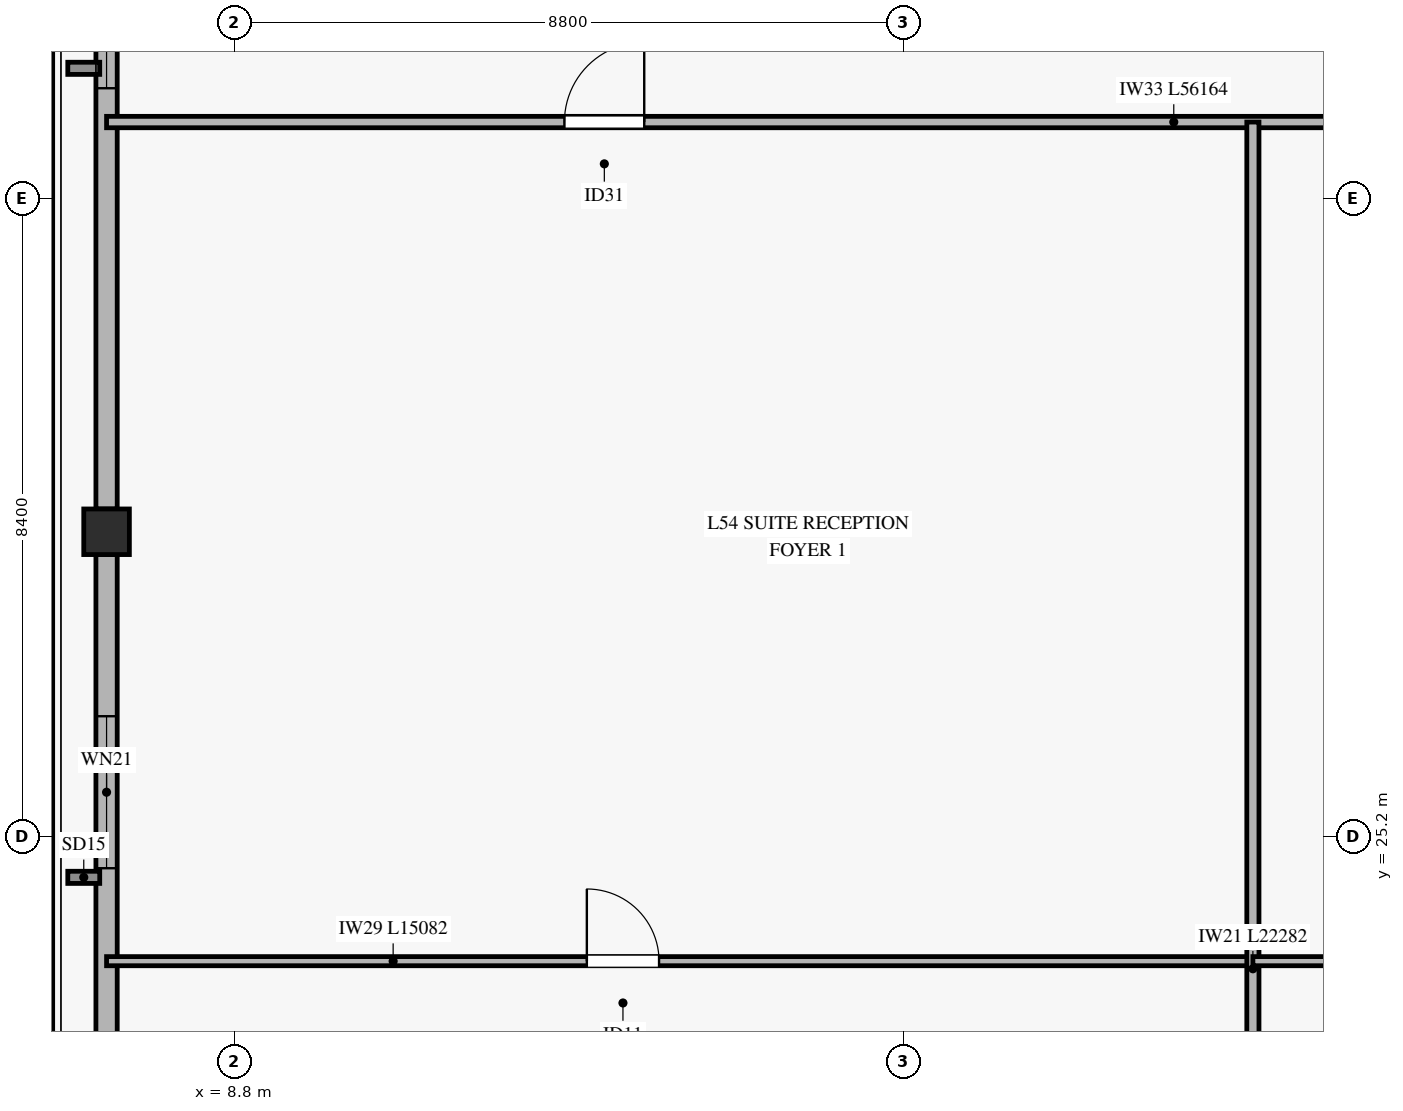
"""IFC4 building model, lengths in metres.
Left out: names, types, materials, properties, quantities, classifications, styles, units other than length and angle.
Written with IfcOpenShell. Run it as: python <this file> out.ifc"""

import sys

from ifc_helpers import new_model, si_unit, direction, frame, frame_2d, origin, origin_2d, place, context, subcontext, project, spatial, rectangle, hollow_rectangle, extrude, source, transform, mapped, element, fill, save


model = new_model("IFC4")
c1 = context("Model", 3, precision=1e-05, world=origin(), true_north=direction((0.0, 1.0)))
c2 = subcontext(c1, "Body", "Model", "MODEL_VIEW")
j1 = project(units=[si_unit("LENGTHUNIT", "METRE"), si_unit("PLANEANGLEUNIT", "RADIAN")], contexts=[c1])
p1 = place(None, origin())
s1 = spatial("IfcSite", under=j1, at=p1, CompositionType="ELEMENT")
p2 = place(p1, origin())
s2 = spatial("IfcBuilding", under=s1, at=p2, CompositionType="ELEMENT")
p3 = place(p2, frame((0.0, 0.0, 213.2)))
s3 = spatial("IfcBuildingStorey", under=s2, at=p3, CompositionType="ELEMENT", Elevation=213.2)
m1 = source(origin(), c2, "Body", "SweptSolid", [
    extrude(hollow_rectangle(XDim=0.6, YDim=0.6, WallThickness=0.028, at=origin_2d()), origin(), (0.0, 0.0, 1.0), 3.27),
])
p4 = place(p3, frame((7.118, 29.209, 0.0), z_axis=(0.0, 0.0, 1.0), x_axis=(1.0, 0.0, 0.0)))
e1 = element("IfcColumn", 1, at=p4, inside=s3, PredefinedType="COLUMN", context=c2, shape_type="MappedRepresentation", body=[
    mapped(m1, transform((0.0, 0.0, 0.0), x_axis=(1.0, 0.0, 0.0), y_axis=(0.0, 1.0, 0.0), z_axis=(0.0, 0.0, 1.0), scale=1.0)),
])
p5 = place(p3, frame((7.118, 15.072, 0.0), z_axis=(0.0, 0.0, 1.0), x_axis=(0.0, 1.0, 0.0)))
e2 = element("IfcWall", 2, at=p5, inside=s3, PredefinedType="SOLIDWALL", context=c2, shape_type="SweptSolid", body=[
    extrude(rectangle(XDim=13.837, YDim=0.28, at=frame_2d((6.918, 0.0))), origin(), (0.0, 0.0, 1.0), 2.75),
])
p6 = place(p5, frame((9.71, 0.0, 0.45)))
e3 = element("IfcOpeningElement", 3, at=p6, cuts=e2, PredefinedType="OPENING", context=c2, shape_type="SweptSolid", body=[
    extrude(rectangle(XDim=2.0, YDim=2.0, at=frame_2d((1.0, 1.0))), frame((0.0, 0.15, 0.0), z_axis=(0.0, -1.0, 0.0), x_axis=(1.0, 0.0, 0.0)), (0.0, 0.0, 1.0), 0.3),
])
p7 = place(p3, frame((7.118, 29.509, 0.0), z_axis=(0.0, 0.0, 1.0), x_axis=(0.0, 1.0, 0.0)))
e4 = element("IfcWall", 4, at=p7, inside=s3, PredefinedType="SOLIDWALL", context=c2, shape_type="SweptSolid", body=[
    extrude(rectangle(XDim=13.837, YDim=0.28, at=frame_2d((6.918, 0.0))), origin(), (0.0, 0.0, 1.0), 2.75),
])
p8 = place(p7, frame((5.536, 0.0, 0.45)))
e5 = element("IfcOpeningElement", 5, at=p8, cuts=e4, PredefinedType="OPENING", context=c2, shape_type="SweptSolid", body=[
    extrude(rectangle(XDim=2.0, YDim=2.0, at=frame_2d((1.0, 1.0))), frame((0.0, 0.15, 0.0), z_axis=(0.0, -1.0, 0.0), x_axis=(1.0, 0.0, 0.0)), (0.0, 0.0, 1.0), 0.3),
])
p9 = place(p3, frame((7.118, 34.6, 0.0), z_axis=(0.0, 0.0, 1.0), x_axis=(1.0, 0.0, 0.0)))
e6 = element("IfcWall", 6, at=p9, inside=s3, PredefinedType="PARTITIONING", context=c2, shape_type="SweptSolid", body=[
    extrude(rectangle(XDim=56.164, YDim=0.15, at=frame_2d((28.082, 0.0))), origin(), (0.0, 0.0, 1.0), 2.455),
])
p10 = place(p9, frame((6.024, 0.0, 0.0)))
e7 = element("IfcOpeningElement", 7, at=p10, cuts=e6, PredefinedType="OPENING", context=c2, shape_type="SweptSolid", body=[
    extrude(rectangle(XDim=1.05, YDim=2.15, at=frame_2d((0.525, 1.075))), frame((0.0, 0.085, 0.0), z_axis=(0.0, -1.0, 0.0), x_axis=(1.0, 0.0, 0.0)), (0.0, 0.0, 1.0), 0.17),
])
p11 = place(p9, frame((17.379, 0.0, 0.0)))
e8 = element("IfcOpeningElement", 8, at=p11, cuts=e6, PredefinedType="OPENING", context=c2, shape_type="SweptSolid", body=[
    extrude(rectangle(XDim=1.05, YDim=2.15, at=frame_2d((0.525, 1.075))), frame((0.0, 0.085, 0.0), z_axis=(0.0, -1.0, 0.0), x_axis=(1.0, 0.0, 0.0)), (0.0, 0.0, 1.0), 0.17),
])
p12 = place(p9, frame((22.751, 0.0, 0.0)))
e9 = element("IfcOpeningElement", 9, at=p12, cuts=e6, PredefinedType="OPENING", context=c2, shape_type="SweptSolid", body=[
    extrude(rectangle(XDim=1.05, YDim=2.15, at=frame_2d((0.525, 1.075))), frame((0.0, 0.085, 0.0), z_axis=(0.0, -1.0, 0.0), x_axis=(1.0, 0.0, 0.0)), (0.0, 0.0, 1.0), 0.17),
])
p13 = place(p9, frame((28.038, 0.0, 0.0)))
e10 = element("IfcOpeningElement", 10, at=p13, cuts=e6, PredefinedType="OPENING", context=c2, shape_type="SweptSolid", body=[
    extrude(rectangle(XDim=1.05, YDim=2.15, at=frame_2d((0.525, 1.075))), frame((0.0, 0.085, 0.0), z_axis=(0.0, -1.0, 0.0), x_axis=(1.0, 0.0, 0.0)), (0.0, 0.0, 1.0), 0.17),
])
p14 = place(p9, frame((33.038, 0.0, 0.0)))
e11 = element("IfcOpeningElement", 11, at=p14, cuts=e6, PredefinedType="OPENING", context=c2, shape_type="SweptSolid", body=[
    extrude(rectangle(XDim=1.05, YDim=2.15, at=frame_2d((0.525, 1.075))), frame((0.0, 0.085, 0.0), z_axis=(0.0, -1.0, 0.0), x_axis=(1.0, 0.0, 0.0)), (0.0, 0.0, 1.0), 0.17),
])
p15 = place(p9, frame((43.558, 0.0, 0.0)))
e12 = element("IfcOpeningElement", 12, at=p15, cuts=e6, PredefinedType="OPENING", context=c2, shape_type="SweptSolid", body=[
    extrude(rectangle(XDim=1.05, YDim=2.15, at=frame_2d((0.525, 1.075))), frame((0.0, 0.085, 0.0), z_axis=(0.0, -1.0, 0.0), x_axis=(1.0, 0.0, 0.0)), (0.0, 0.0, 1.0), 0.17),
])
p16 = place(p3, frame((7.118, 23.559, 0.0), z_axis=(0.0, 0.0, 1.0), x_axis=(1.0, 0.0, 0.0)))
e13 = element("IfcWall", 13, at=p16, inside=s3, PredefinedType="PARTITIONING", context=c2, shape_type="SweptSolid", body=[
    extrude(rectangle(XDim=15.082, YDim=0.12, at=frame_2d((7.541, 0.0))), origin(), (0.0, 0.0, 1.0), 2.455),
])
p17 = place(p16, frame((6.319, 0.0, 0.0)))
e14 = element("IfcOpeningElement", 14, at=p17, cuts=e13, PredefinedType="OPENING", context=c2, shape_type="SweptSolid", body=[
    extrude(rectangle(XDim=0.95, YDim=2.1, at=frame_2d((0.475, 1.05))), frame((0.0, 0.07, 0.0), z_axis=(0.0, -1.0, 0.0), x_axis=(1.0, 0.0, 0.0)), (0.0, 0.0, 1.0), 0.14),
])
p18 = place(p3, frame((22.2, 12.318, 0.0), z_axis=(0.0, 0.0, 1.0), x_axis=(0.0, 1.0, 0.0)))
e15 = element("IfcWall", 15, at=p18, inside=s3, PredefinedType="PARTITIONING", context=c2, shape_type="SweptSolid", body=[
    extrude(rectangle(XDim=22.282, YDim=0.16, at=frame_2d((11.141, 0.0))), origin(), (0.0, 0.0, 1.0), 2.755),
])
p19 = place(p3, frame((22.2, 23.559, 0.0), z_axis=(0.0, 0.0, 1.0), x_axis=(1.0, 0.0, 0.0)))
e16 = element("IfcWall", 16, at=p19, inside=s3, PredefinedType="PARTITIONING", context=c2, shape_type="SweptSolid", body=[
    extrude(rectangle(XDim=5.6, YDim=0.12, at=frame_2d((2.8, 0.0))), origin(), (0.0, 0.0, 1.0), 3.27),
])
p20 = place(p19, frame((2.406, 0.0, 0.0)))
e17 = element("IfcOpeningElement", 17, at=p20, cuts=e16, PredefinedType="OPENING", context=c2, shape_type="SweptSolid", body=[
    extrude(rectangle(XDim=0.95, YDim=2.1, at=frame_2d((0.475, 1.05))), frame((0.0, 0.07, 0.0), z_axis=(0.0, -1.0, 0.0), x_axis=(1.0, 0.0, 0.0)), (0.0, 0.0, 1.0), 0.14),
])
m2 = source(origin(), c2, "Body", "SweptSolid", [
    extrude(rectangle(XDim=2.0, YDim=2.0, at=frame_2d((1.0, 1.0))), frame((0.0, 0.03, 0.0), z_axis=(0.0, -1.0, 0.0), x_axis=(1.0, 0.0, 0.0)), (0.0, 0.0, 1.0), 0.06),
])
p21 = place(p6, origin())
e18 = element("IfcWindow", 18, at=p21, inside=s3, PartitioningType="SINGLE_PANEL", PredefinedType="WINDOW", context=c2, shape_type="MappedRepresentation", body=[
    mapped(m2, transform((0.0, 0.0, 0.0), x_axis=(1.0, 0.0, 0.0), y_axis=(0.0, 1.0, 0.0), z_axis=(0.0, 0.0, 1.0), scale=1.0)),
])
fill(e3, e18)
p22 = place(p8, origin())
e19 = element("IfcWindow", 19, at=p22, inside=s3, PartitioningType="SINGLE_PANEL", PredefinedType="WINDOW", context=c2, shape_type="MappedRepresentation", body=[
    mapped(m2, transform((0.0, 0.0, 0.0), x_axis=(1.0, 0.0, 0.0), y_axis=(0.0, 1.0, 0.0), z_axis=(0.0, 0.0, 1.0), scale=1.0)),
])
fill(e5, e19)
m3 = source(origin(), c2, "Body", "SweptSolid", [
    extrude(rectangle(XDim=1.05, YDim=2.15, at=frame_2d((0.525, 1.075))), frame((0.0, 0.025, 0.0), z_axis=(0.0, -1.0, 0.0), x_axis=(1.0, 0.0, 0.0)), (0.0, 0.0, 1.0), 0.05),
])
p23 = place(p10, origin())
e20 = element("IfcDoor", 20, at=p23, inside=s3, OperationType="SINGLE_SWING_RIGHT", PredefinedType="DOOR", context=c2, shape_type="MappedRepresentation", body=[
    mapped(m3, transform((0.0, 0.0, 0.0), x_axis=(1.0, 0.0, 0.0), y_axis=(0.0, 1.0, 0.0), z_axis=(0.0, 0.0, 1.0), scale=1.0)),
])
fill(e7, e20)
m4 = source(origin(), c2, "Body", "SweptSolid", [
    extrude(rectangle(XDim=0.95, YDim=2.1, at=frame_2d((0.475, 1.05))), frame((0.0, 0.025, 0.0), z_axis=(0.0, -1.0, 0.0), x_axis=(1.0, 0.0, 0.0)), (0.0, 0.0, 1.0), 0.05),
])
p24 = place(p17, origin())
e21 = element("IfcDoor", 21, at=p24, inside=s3, OperationType="SINGLE_SWING_LEFT", PredefinedType="DOOR", context=c2, shape_type="MappedRepresentation", body=[
    mapped(m4, transform((0.0, 0.0, 0.0), x_axis=(1.0, 0.0, 0.0), y_axis=(0.0, 1.0, 0.0), z_axis=(0.0, 0.0, 1.0), scale=1.0)),
])
fill(e14, e21)
save(model, sys.argv[1])
